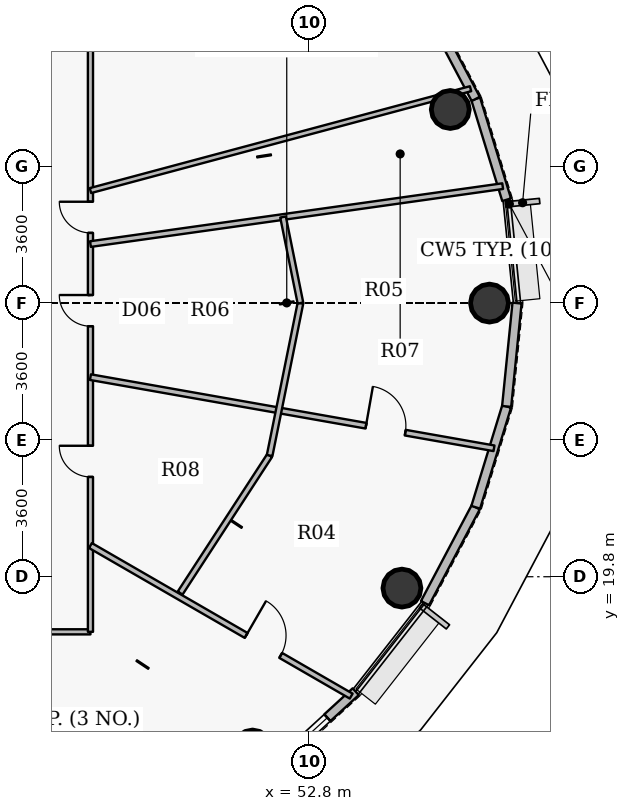
"""IFC4 building model, lengths in metres.
Left out: names, types, materials, properties, quantities, classifications, styles, units other than length and angle.
Written with IfcOpenShell. Run it as: python <this file> out.ifc"""

import sys

from ifc_helpers import new_model, si_unit, direction, frame, frame_2d, origin, origin_2d, place, context, subcontext, project, spatial, rectangle, hollow_circle, extrude, source, transform, mapped, element, fill, save


model = new_model("IFC4")
c1 = context("Model", 3, precision=1e-05, world=origin(), true_north=direction((0.0, 1.0)))
c2 = subcontext(c1, "Body", "Model", "MODEL_VIEW")
j1 = project(units=[si_unit("LENGTHUNIT", "METRE"), si_unit("PLANEANGLEUNIT", "RADIAN")], contexts=[c1])
p1 = place(None, origin())
s1 = spatial("IfcSite", under=j1, at=p1, CompositionType="ELEMENT")
p2 = place(p1, origin())
s2 = spatial("IfcBuilding", under=s1, at=p2, CompositionType="ELEMENT")
p3 = place(p2, frame((0.0, 0.0, 268.2)))
s3 = spatial("IfcBuildingStorey", under=s2, at=p3, CompositionType="ELEMENT", Elevation=268.2)
for number, where, z_axis, x_axis in (
    (1, (57.55, 27.0, -0.3), (0.0, 0.0, 1.0), (1.0, 0.0, 0.0)),
    (2, (56.519, 32.094, -0.3), (0.0, 0.0, 1.0), (1.0, 0.0, 0.0)),
    (3, (51.315, 15.267, -0.3), (0.0, 0.0, 1.0), (1.0, 0.0, 0.0)),
    (4, (55.246, 19.5, -0.3), (0.0, 0.0, 1.0), (1.0, 0.0, 0.0)),
):
    element("IfcColumn", number, at=place(p3, frame(where, z_axis=z_axis, x_axis=x_axis)), inside=s3, PredefinedType="COLUMN", context=c2, shape_type="SweptSolid", body=[
        extrude(hollow_circle(Radius=0.5, WallThickness=0.032, at=origin_2d()), origin(), (0.0, 0.0, 1.0), 5.1),
    ])
p4 = place(p3, frame((57.188, 32.372, 0.0), z_axis=(0.0, 0.0, 1.0), x_axis=(0.2931213403, -0.956075248012, 0.0)))
e5 = element("IfcWall", 5, at=p4, inside=s3, PredefinedType="SOLIDWALL", context=c2, shape_type="SweptSolid", body=[
    extrude(rectangle(XDim=2.775, YDim=0.24, at=frame_2d((1.388, 0.0))), origin(), (0.0, 0.0, 1.0), 4.55),
])
p5 = place(p3, frame((55.854, 34.895, 0.0), z_axis=(0.0, 0.0, 1.0), x_axis=(0.467628269026, -0.883925224218, 0.0)))
e6 = element("IfcWall", 6, at=p5, inside=s3, PredefinedType="SOLIDWALL", context=c2, shape_type="SweptSolid", body=[
    extrude(rectangle(XDim=2.854, YDim=0.24, at=frame_2d((1.427, 0.0))), origin(), (0.0, 0.0, 1.0), 4.55),
])
p6 = place(p3, frame((54.03, 16.775, 0.0), z_axis=(0.0, 0.0, 1.0), x_axis=(-0.737068506972, -0.675818034703, 0.0)))
e7 = element("IfcWall", 7, at=p6, inside=s3, PredefinedType="SOLIDWALL", context=c2, shape_type="SweptSolid", body=[
    extrude(rectangle(XDim=3.077, YDim=0.24, at=frame_2d((1.539, 0.0))), origin(), (0.0, 0.0, 1.0), 4.55),
])
p7 = place(p6, frame((1.012, 0.0, 0.9)))
e8 = element("IfcOpeningElement", 8, at=p7, cuts=e7, PredefinedType="OPENING", context=c2, shape_type="SweptSolid", body=[
    extrude(rectangle(XDim=1.25, YDim=1.65, at=origin_2d()), frame((0.625, 0.13, 0.825), z_axis=(0.0, -1.0, 0.0), x_axis=(1.0, 0.0, 0.0)), (0.0, 0.0, 1.0), 0.26),
])
p8 = place(p3, frame((57.188, 21.628, 0.0), z_axis=(0.0, 0.0, 1.0), x_axis=(-0.467628269026, -0.883925224218, 0.0)))
e9 = element("IfcWall", 9, at=p8, inside=s3, PredefinedType="SOLIDWALL", context=c2, shape_type="SweptSolid", body=[
    extrude(rectangle(XDim=2.854, YDim=0.24, at=frame_2d((1.427, 0.0))), origin(), (0.0, 0.0, 1.0), 4.55),
])
p9 = place(p3, frame((58.002, 24.281, 0.0), z_axis=(0.0, 0.0, 1.0), x_axis=(-0.2931213403, -0.956075248012, 0.0)))
e10 = element("IfcWall", 10, at=p9, inside=s3, PredefinedType="SOLIDWALL", context=c2, shape_type="SweptSolid", body=[
    extrude(rectangle(XDim=2.775, YDim=0.24, at=frame_2d((1.388, 0.0))), origin(), (0.0, 0.0, 1.0), 4.55),
])
p10 = place(p3, frame((58.275, 27.0, 0.0), z_axis=(0.0, 0.0, 1.0), x_axis=(-0.099972526841, -0.99499019788, 0.0)))
e11 = element("IfcWall", 11, at=p10, inside=s3, PredefinedType="SOLIDWALL", context=c2, shape_type="SweptSolid", body=[
    extrude(rectangle(XDim=2.733, YDim=0.24, at=frame_2d((1.366, 0.0))), origin(), (0.0, 0.0, 1.0), 4.55),
])
p11 = place(p3, frame((36.95, 18.35, 0.0), z_axis=(0.0, 0.0, 1.0), x_axis=(1.0, 0.0, 0.0)))
e12 = element("IfcWall", 12, at=p11, inside=s3, PredefinedType="PARTITIONING", context=c2, shape_type="SweptSolid", body=[
    extrude(rectangle(XDim=10.1, YDim=0.135, at=frame_2d((5.05, 0.0))), origin(), (0.0, 0.0, 1.0), 4.085),
])
p12 = place(p11, frame((6.022, 0.0, 0.0)))
e13 = element("IfcOpeningElement", 13, at=p12, cuts=e12, PredefinedType="OPENING", context=c2, shape_type="SweptSolid", body=[
    extrude(rectangle(XDim=1.1, YDim=2.15, at=origin_2d()), frame((0.55, 0.078, 1.075), z_axis=(0.0, -1.0, 0.0), x_axis=(1.0, 0.0, 0.0)), (0.0, 0.0, 1.0), 0.155),
])
p13 = place(p3, frame((47.05, 18.35, 0.0), z_axis=(0.0, 0.0, 1.0), x_axis=(0.0, 1.0, 0.0)))
e14 = element("IfcWall", 14, at=p13, inside=s3, PredefinedType="PARTITIONING", context=c2, shape_type="SweptSolid", body=[
    extrude(rectangle(XDim=17.3, YDim=0.135, at=frame_2d((8.65, 0.0))), origin(), (0.0, 0.0, 1.0), 4.085),
])
p14 = place(p13, frame((4.076, 0.0, 0.0)))
e15 = element("IfcOpeningElement", 15, at=p14, cuts=e14, PredefinedType="OPENING", context=c2, shape_type="SweptSolid", body=[
    extrude(rectangle(XDim=0.82, YDim=2.1, at=origin_2d()), frame((0.41, 0.078, 1.05), z_axis=(0.0, -1.0, 0.0), x_axis=(1.0, 0.0, 0.0)), (0.0, 0.0, 1.0), 0.155),
])
p15 = place(p13, frame((8.042, 0.0, 0.0)))
e16 = element("IfcOpeningElement", 16, at=p15, cuts=e14, PredefinedType="OPENING", context=c2, shape_type="SweptSolid", body=[
    extrude(rectangle(XDim=0.82, YDim=2.1, at=origin_2d()), frame((0.41, 0.078, 1.05), z_axis=(0.0, -1.0, 0.0), x_axis=(1.0, 0.0, 0.0)), (0.0, 0.0, 1.0), 0.155),
])
p16 = place(p13, frame((10.497, 0.0, 0.0)))
e17 = element("IfcOpeningElement", 17, at=p16, cuts=e14, PredefinedType="OPENING", context=c2, shape_type="SweptSolid", body=[
    extrude(rectangle(XDim=0.82, YDim=2.1, at=origin_2d()), frame((0.41, 0.078, 1.05), z_axis=(0.0, -1.0, 0.0), x_axis=(1.0, 0.0, 0.0)), (0.0, 0.0, 1.0), 0.155),
])
p17 = place(p3, frame((47.05, 20.62, 0.0), z_axis=(0.0, 0.0, 1.0), x_axis=(0.866021364002, -0.500006997044, 0.0)))
e18 = element("IfcWall", 18, at=p17, inside=s3, PredefinedType="PARTITIONING", context=c2, shape_type="SweptSolid", body=[
    extrude(rectangle(XDim=7.922, YDim=0.15, at=frame_2d((3.961, 0.0))), origin(), (0.0, 0.0, 1.0), 4.035),
])
p18 = place(p17, frame((4.731, 0.0, 0.0)))
e19 = element("IfcOpeningElement", 19, at=p18, cuts=e18, PredefinedType="OPENING", context=c2, shape_type="SweptSolid", body=[
    extrude(rectangle(XDim=1.05, YDim=2.15, at=origin_2d()), frame((0.525, 0.085, 1.075), z_axis=(0.0, -1.0, 0.0), x_axis=(1.0, 0.0, 0.0)), (0.0, 0.0, 1.0), 0.17),
])
p19 = place(p3, frame((47.05, 25.052, 0.0), z_axis=(0.0, 0.0, 1.0), x_axis=(0.98480975996, -0.173636795318, 0.0)))
e20 = element("IfcWall", 20, at=p19, inside=s3, PredefinedType="PARTITIONING", context=c2, shape_type="SweptSolid", body=[
    extrude(rectangle(XDim=10.783, YDim=0.15, at=frame_2d((5.392, 0.0))), origin(), (0.0, 0.0, 1.0), 4.035),
])
p20 = place(p19, frame((7.362, 0.0, 0.0)))
e21 = element("IfcOpeningElement", 21, at=p20, cuts=e20, PredefinedType="OPENING", context=c2, shape_type="SweptSolid", body=[
    extrude(rectangle(XDim=1.05, YDim=2.15, at=origin_2d()), frame((0.525, 0.085, 1.075), z_axis=(0.0, -1.0, 0.0), x_axis=(1.0, 0.0, 0.0)), (0.0, 0.0, 1.0), 0.17),
])
p21 = place(p3, frame((47.05, 28.553, 0.0), z_axis=(0.0, 0.0, 1.0), x_axis=(0.990268341347, 0.139171161254, 0.0)))
e22 = element("IfcWall", 22, at=p21, inside=s3, PredefinedType="PARTITIONING", context=c2, shape_type="SweptSolid", body=[
    extrude(rectangle(XDim=10.954, YDim=0.15, at=frame_2d((5.477, 0.0))), origin(), (0.0, 0.0, 1.0), 4.035),
])
p22 = place(p3, frame((47.05, 29.961, 0.0), z_axis=(0.0, 0.0, 1.0), x_axis=(0.965926265822, 0.258817404739, 0.0)))
e23 = element("IfcWall", 23, at=p22, inside=s3, PredefinedType="PARTITIONING", context=c2, shape_type="SweptSolid", body=[
    extrude(rectangle(XDim=10.354, YDim=0.135, at=frame_2d((5.177, 0.0))), origin(), (0.0, 0.0, 1.0), 4.035),
])
p23 = place(p3, frame((49.41, 19.371, 0.0), z_axis=(0.0, 0.0, 1.0), x_axis=(0.545425615992, 0.838159231543, 0.0)))
e24 = element("IfcWall", 24, at=p23, inside=s3, PredefinedType="PARTITIONING", context=c2, shape_type="SweptSolid", body=[
    extrude(rectangle(XDim=4.317, YDim=0.15, at=frame_2d((2.158, 0.0))), origin(), (0.0, 0.0, 1.0), 4.035),
])
p24 = place(p3, frame((51.765, 22.989, 0.0), z_axis=(0.0, 0.0, 1.0), x_axis=(0.198238065291, 0.98015390091, 0.0)))
e25 = element("IfcWall", 25, at=p24, inside=s3, PredefinedType="PARTITIONING", context=c2, shape_type="SweptSolid", body=[
    extrude(rectangle(XDim=4.093, YDim=0.15, at=frame_2d((2.046, 0.0))), origin(), (0.0, 0.0, 1.0), 4.085),
])
p25 = place(p3, frame((52.118, 29.265, 0.0), z_axis=(0.0, 0.0, 1.0), x_axis=(0.198187942802, -0.980164036949, 0.0)))
e26 = element("IfcWall", 26, at=p25, inside=s3, PredefinedType="PARTITIONING", context=c2, shape_type="SweptSolid", body=[
    extrude(rectangle(XDim=2.311, YDim=0.15, at=frame_2d((1.156, 0.0))), origin(), (0.0, 0.0, 1.0), 4.035),
])
m1 = source(origin(), c2, "Body", "SweptSolid", [
    extrude(rectangle(XDim=1.25, YDim=1.65, at=origin_2d()), frame((0.625, 0.03, 0.825), z_axis=(0.0, -1.0, 0.0), x_axis=(1.0, 0.0, 0.0)), (0.0, 0.0, 1.0), 0.06),
])
p26 = place(p7, origin())
e27 = element("IfcWindow", 27, at=p26, inside=s3, PartitioningType="SINGLE_PANEL", PredefinedType="WINDOW", context=c2, shape_type="MappedRepresentation", body=[
    mapped(m1, transform((0.0, 0.0, 0.0), x_axis=(1.0, 0.0, 0.0), y_axis=(0.0, 1.0, 0.0), z_axis=(0.0, 0.0, 1.0), scale=1.0)),
])
fill(e8, e27)
m2 = source(origin(), c2, "Body", "SweptSolid", [
    extrude(rectangle(XDim=0.82, YDim=2.1, at=origin_2d()), frame((0.41, 0.025, 1.05), z_axis=(0.0, -1.0, 0.0), x_axis=(1.0, 0.0, 0.0)), (0.0, 0.0, 1.0), 0.05),
])
p27 = place(p14, origin())
e28 = element("IfcDoor", 28, at=p27, inside=s3, OperationType="SINGLE_SWING_RIGHT", PredefinedType="DOOR", context=c2, shape_type="MappedRepresentation", body=[
    mapped(m2, transform((0.0, 0.0, 0.0), x_axis=(1.0, 0.0, 0.0), y_axis=(0.0, 1.0, 0.0), z_axis=(0.0, 0.0, 1.0), scale=1.0)),
])
fill(e15, e28)
m3 = source(origin(), c2, "Body", "SweptSolid", [
    extrude(rectangle(XDim=1.05, YDim=2.15, at=origin_2d()), frame((0.525, 0.025, 1.075), z_axis=(0.0, -1.0, 0.0), x_axis=(1.0, 0.0, 0.0)), (0.0, 0.0, 1.0), 0.05),
])
p28 = place(p18, origin())
e29 = element("IfcDoor", 29, at=p28, inside=s3, OperationType="SINGLE_SWING_LEFT", PredefinedType="DOOR", context=c2, shape_type="MappedRepresentation", body=[
    mapped(m3, transform((0.0, 0.0, 0.0), x_axis=(1.0, 0.0, 0.0), y_axis=(0.0, 1.0, 0.0), z_axis=(0.0, 0.0, 1.0), scale=1.0)),
])
fill(e19, e29)
p29 = place(p15, origin())
e30 = element("IfcDoor", 30, at=p29, inside=s3, OperationType="SINGLE_SWING_RIGHT", PredefinedType="DOOR", context=c2, shape_type="MappedRepresentation", body=[
    mapped(m2, transform((0.0, 0.0, 0.0), x_axis=(1.0, 0.0, 0.0), y_axis=(0.0, 1.0, 0.0), z_axis=(0.0, 0.0, 1.0), scale=1.0)),
])
fill(e16, e30)
p30 = place(p20, origin())
e31 = element("IfcDoor", 31, at=p30, inside=s3, OperationType="SINGLE_SWING_LEFT", PredefinedType="DOOR", context=c2, shape_type="MappedRepresentation", body=[
    mapped(m3, transform((0.0, 0.0, 0.0), x_axis=(1.0, 0.0, 0.0), y_axis=(0.0, 1.0, 0.0), z_axis=(0.0, 0.0, 1.0), scale=1.0)),
])
fill(e21, e31)
p31 = place(p16, origin())
e32 = element("IfcDoor", 32, at=p31, inside=s3, OperationType="SINGLE_SWING_RIGHT", PredefinedType="DOOR", context=c2, shape_type="MappedRepresentation", body=[
    mapped(m2, transform((0.0, 0.0, 0.0), x_axis=(1.0, 0.0, 0.0), y_axis=(0.0, 1.0, 0.0), z_axis=(0.0, 0.0, 1.0), scale=1.0)),
])
fill(e17, e32)
save(model, sys.argv[1])
